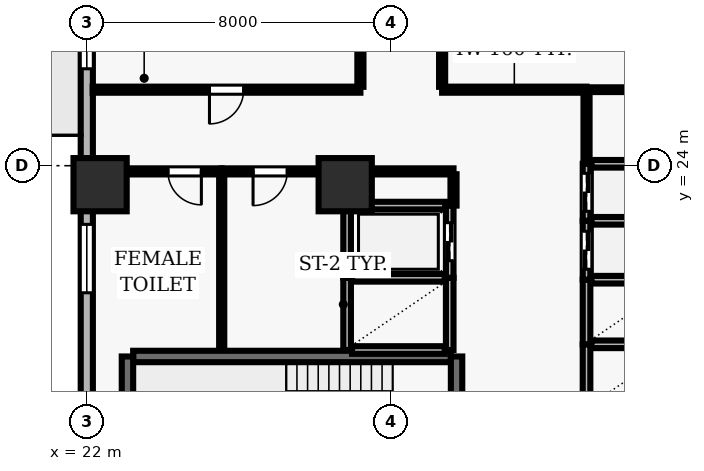
"""IFC4 building model, lengths in metres.
Left out: names, types, materials, properties, quantities, classifications, styles, units other than length and angle.
Written with IfcOpenShell. Run it as: python <this file> out.ifc"""

import sys

from ifc_helpers import new_model, si_unit, direction, frame, frame_2d, origin, origin_2d, place, context, subcontext, project, spatial, rectangle, extrude, element, fill, save


model = new_model("IFC4")
c1 = context("Model", 3, precision=1e-05, world=origin(), true_north=direction((0.0, 1.0)))
c2 = subcontext(c1, "Body", "Model", "MODEL_VIEW")
j1 = project(units=[si_unit("LENGTHUNIT", "METRE"), si_unit("PLANEANGLEUNIT", "RADIAN")], contexts=[c1])
p1 = place(None, origin())
s1 = spatial("IfcSite", under=j1, at=p1, CompositionType="ELEMENT")
p2 = place(p1, origin())
s2 = spatial("IfcBuilding", under=s1, at=p2, CompositionType="ELEMENT")
p3 = place(p2, frame((0.0, 0.0, 42.7)))
s3 = spatial("IfcBuildingStorey", under=s2, at=p3, CompositionType="ELEMENT", Elevation=42.7)
for number, where, z_axis, x_axis in (
    (1, (22.35, 23.5, 0.0), (0.0, 0.0, 1.0), (1.0, 0.0, 0.0)),
    (2, (28.8, 23.5, 0.0), (0.0, 0.0, 1.0), (1.0, 0.0, 0.0)),
):
    element("IfcColumn", number, at=place(p3, frame(where, z_axis=z_axis, x_axis=x_axis)), inside=s3, PredefinedType="COLUMN", context=c2, shape_type="SweptSolid", body=[
        extrude(rectangle(XDim=1.4, YDim=1.4, at=origin_2d()), origin(), (0.0, 0.0, 1.0), 3.9),
    ])
p4 = place(p3, frame((22.0, 51.5, 0.0), z_axis=(0.0, 0.0, 1.0), x_axis=(0.0, -1.0, 0.0)))
e3 = element("IfcWall", 3, at=p4, inside=s3, PredefinedType="SOLIDWALL", context=c2, shape_type="SweptSolid", body=[
    extrude(rectangle(XDim=49.0, YDim=0.32, at=frame_2d((24.5, 0.0))), origin(), (0.0, 0.0, 1.0), 3.69),
])
p5 = place(p4, frame((12.1, 0.0, 0.0)))
e4 = element("IfcOpeningElement", 4, at=p5, cuts=e3, PredefinedType="OPENING", context=c2, shape_type="SweptSolid", body=[
    extrude(rectangle(XDim=1.0, YDim=2.2, at=frame_2d((0.5, 1.1))), frame((0.0, 0.17, 0.0), z_axis=(0.0, -1.0, 0.0), x_axis=(1.0, 0.0, 0.0)), (0.0, 0.0, 1.0), 0.34),
])
p6 = place(p4, frame((1.822, 0.0, 0.9)))
e5 = element("IfcOpeningElement", 5, at=p6, cuts=e3, PredefinedType="OPENING", context=c2, shape_type="SweptSolid", body=[
    extrude(rectangle(XDim=1.8, YDim=2.2, at=frame_2d((0.9, 1.1))), frame((0.0, 0.17, 0.0), z_axis=(0.0, -1.0, 0.0), x_axis=(1.0, 0.0, 0.0)), (0.0, 0.0, 1.0), 0.34),
])
p7 = place(p4, frame((7.267, 0.0, 0.9)))
e6 = element("IfcOpeningElement", 6, at=p7, cuts=e3, PredefinedType="OPENING", context=c2, shape_type="SweptSolid", body=[
    extrude(rectangle(XDim=1.8, YDim=2.2, at=frame_2d((0.9, 1.1))), frame((0.0, 0.17, 0.0), z_axis=(0.0, -1.0, 0.0), x_axis=(1.0, 0.0, 0.0)), (0.0, 0.0, 1.0), 0.34),
])
p8 = place(p4, frame((19.056, 0.0, 0.9)))
e7 = element("IfcOpeningElement", 7, at=p8, cuts=e3, PredefinedType="OPENING", context=c2, shape_type="SweptSolid", body=[
    extrude(rectangle(XDim=1.8, YDim=2.2, at=frame_2d((0.9, 1.1))), frame((0.0, 0.17, 0.0), z_axis=(0.0, -1.0, 0.0), x_axis=(1.0, 0.0, 0.0)), (0.0, 0.0, 1.0), 0.34),
])
p9 = place(p4, frame((23.15, 0.0, 0.9)))
e8 = element("IfcOpeningElement", 8, at=p9, cuts=e3, PredefinedType="OPENING", context=c2, shape_type="SweptSolid", body=[
    extrude(rectangle(XDim=1.8, YDim=2.2, at=frame_2d((0.9, 1.1))), frame((0.0, 0.17, 0.0), z_axis=(0.0, -1.0, 0.0), x_axis=(1.0, 0.0, 0.0)), (0.0, 0.0, 1.0), 0.34),
])
p10 = place(p4, frame((29.044, 0.0, 0.9)))
e9 = element("IfcOpeningElement", 9, at=p10, cuts=e3, PredefinedType="OPENING", context=c2, shape_type="SweptSolid", body=[
    extrude(rectangle(XDim=1.8, YDim=2.2, at=frame_2d((0.9, 1.1))), frame((0.0, 0.17, 0.0), z_axis=(0.0, -1.0, 0.0), x_axis=(1.0, 0.0, 0.0)), (0.0, 0.0, 1.0), 0.34),
])
p11 = place(p4, frame((34.039, 0.0, 0.9)))
e10 = element("IfcOpeningElement", 10, at=p11, cuts=e3, PredefinedType="OPENING", context=c2, shape_type="SweptSolid", body=[
    extrude(rectangle(XDim=1.8, YDim=2.2, at=frame_2d((0.9, 1.1))), frame((0.0, 0.17, 0.0), z_axis=(0.0, -1.0, 0.0), x_axis=(1.0, 0.0, 0.0)), (0.0, 0.0, 1.0), 0.34),
])
p12 = place(p4, frame((39.933, 0.0, 0.9)))
e11 = element("IfcOpeningElement", 11, at=p12, cuts=e3, PredefinedType="OPENING", context=c2, shape_type="SweptSolid", body=[
    extrude(rectangle(XDim=1.8, YDim=2.2, at=frame_2d((0.9, 1.1))), frame((0.0, 0.17, 0.0), z_axis=(0.0, -1.0, 0.0), x_axis=(1.0, 0.0, 0.0)), (0.0, 0.0, 1.0), 0.34),
])
p13 = place(p3, frame((31.58, 18.98, 0.0), z_axis=(0.0, 0.0, 1.0), x_axis=(-1.0, 0.0, 0.0)))
e12 = element("IfcWall", 12, at=p13, inside=s3, PredefinedType="SHEAR", context=c2, shape_type="SweptSolid", body=[
    extrude(rectangle(XDim=8.36, YDim=0.3, at=frame_2d((4.18, 0.0))), origin(), (0.0, 0.0, 1.0), 3.69),
])
p14 = place(p3, frame((23.07, 18.98, 0.0), z_axis=(0.0, 0.0, 1.0), x_axis=(0.0, -1.0, 0.0)))
e13 = element("IfcWall", 13, at=p14, inside=s3, PredefinedType="SHEAR", context=c2, shape_type="SweptSolid", body=[
    extrude(rectangle(XDim=3.51, YDim=0.3, at=frame_2d((1.755, 0.0))), origin(), (0.0, 0.0, 1.0), 3.69),
])
p15 = place(p3, frame((31.73, 15.47, 0.0), z_axis=(0.0, 0.0, 1.0), x_axis=(0.0, 1.0, 0.0)))
e14 = element("IfcWall", 14, at=p15, inside=s3, PredefinedType="SHEAR", context=c2, shape_type="SweptSolid", body=[
    extrude(rectangle(XDim=3.51, YDim=0.3, at=frame_2d((1.755, 0.0))), origin(), (0.0, 0.0, 1.0), 3.69),
])
p16 = place(p15, frame((1.18, 0.0, 0.0)))
e15 = element("IfcOpeningElement", 15, at=p16, cuts=e14, PredefinedType="OPENING", context=c2, shape_type="SweptSolid", body=[
    extrude(rectangle(XDim=1.15, YDim=2.15, at=frame_2d((0.575, 1.075))), frame((0.0, 0.16, 0.0), z_axis=(0.0, -1.0, 0.0), x_axis=(1.0, 0.0, 0.0)), (0.0, 0.0, 1.0), 0.32),
])
p17 = place(p3, frame((35.15, 19.3, 0.0), z_axis=(0.0, 0.0, 1.0), x_axis=(0.0, -1.0, 0.0)))
e16 = element("IfcWall", 16, at=p17, inside=s3, PredefinedType="SOLIDWALL", context=c2, shape_type="SweptSolid", body=[
    extrude(rectangle(XDim=1.7, YDim=0.2, at=frame_2d((0.85, 0.0))), origin(), (0.0, 0.0, 1.0), 3.69),
])
p18 = place(p3, frame((37.42, 19.3, 0.0), z_axis=(0.0, 0.0, 1.0), x_axis=(-1.0, 0.0, 0.0)))
e17 = element("IfcWall", 17, at=p18, inside=s3, PredefinedType="SOLIDWALL", context=c2, shape_type="SweptSolid", body=[
    extrude(rectangle(XDim=2.14, YDim=0.2, at=frame_2d((1.07, 0.0))), origin(), (0.0, 0.0, 1.0), 3.69),
])
p19 = place(p3, frame((35.15, 21.0, 0.0), z_axis=(0.0, 0.0, 1.0), x_axis=(0.0, -1.0, 0.0)))
e18 = element("IfcWall", 18, at=p19, inside=s3, PredefinedType="SOLIDWALL", context=c2, shape_type="SweptSolid", body=[
    extrude(rectangle(XDim=1.7, YDim=0.2, at=frame_2d((0.85, 0.0))), origin(), (0.0, 0.0, 1.0), 3.69),
])
p20 = place(p3, frame((37.42, 21.0, 0.0), z_axis=(0.0, 0.0, 1.0), x_axis=(-1.0, 0.0, 0.0)))
e19 = element("IfcWall", 19, at=p20, inside=s3, PredefinedType="SOLIDWALL", context=c2, shape_type="SweptSolid", body=[
    extrude(rectangle(XDim=2.14, YDim=0.2, at=frame_2d((1.07, 0.0))), origin(), (0.0, 0.0, 1.0), 3.69),
])
for number, where, z_axis, x_axis in (
    (20, (28.85, 21.05, 0.0), (0.0, 0.0, 1.0), (0.0, -1.0, 0.0)),
    (21, (31.55, 19.15, 0.0), (0.0, 0.0, 1.0), (0.0, 1.0, 0.0)),
):
    element("IfcWall", number, at=place(p3, frame(where, z_axis=z_axis, x_axis=x_axis)), inside=s3, PredefinedType="SOLIDWALL", context=c2, shape_type="SweptSolid", body=[
        extrude(rectangle(XDim=1.9, YDim=0.2, at=frame_2d((0.95, 0.0))), origin(), (0.0, 0.0, 1.0), 3.69),
    ])
for number, where, z_axis, x_axis in (
    (22, (28.98, 19.15, 0.0), (0.0, 0.0, 1.0), (1.0, 0.0, 0.0)),
    (23, (31.42, 21.05, 0.0), (0.0, 0.0, 1.0), (-1.0, 0.0, 0.0)),
):
    element("IfcWall", number, at=place(p3, frame(where, z_axis=z_axis, x_axis=x_axis)), inside=s3, PredefinedType="SOLIDWALL", context=c2, shape_type="SweptSolid", body=[
        extrude(rectangle(XDim=2.44, YDim=0.2, at=frame_2d((1.22, 0.0))), origin(), (0.0, 0.0, 1.0), 3.69),
    ])
p21 = place(p3, frame((35.15, 22.55, 0.0), z_axis=(0.0, 0.0, 1.0), x_axis=(0.0, -1.0, 0.0)))
e24 = element("IfcWall", 24, at=p21, inside=s3, PredefinedType="SOLIDWALL", context=c2, shape_type="SweptSolid", body=[
    extrude(rectangle(XDim=1.55, YDim=0.2, at=frame_2d((0.775, 0.0))), origin(), (0.0, 0.0, 1.0), 3.69),
])
p22 = place(p21, frame((0.275, 0.0, 0.0)))
e25 = element("IfcOpeningElement", 25, at=p22, cuts=e24, PredefinedType="OPENING", context=c2, shape_type="SweptSolid", body=[
    extrude(rectangle(XDim=1.0, YDim=2.1, at=frame_2d((0.5, 1.05))), frame((0.0, 0.11, 0.0), z_axis=(0.0, -1.0, 0.0), x_axis=(1.0, 0.0, 0.0)), (0.0, 0.0, 1.0), 0.22),
])
p23 = place(p3, frame((37.42, 22.55, 0.0), z_axis=(0.0, 0.0, 1.0), x_axis=(-1.0, 0.0, 0.0)))
e26 = element("IfcWall", 26, at=p23, inside=s3, PredefinedType="SOLIDWALL", context=c2, shape_type="SweptSolid", body=[
    extrude(rectangle(XDim=2.14, YDim=0.2, at=frame_2d((1.07, 0.0))), origin(), (0.0, 0.0, 1.0), 3.69),
])
p24 = place(p3, frame((35.15, 24.05, 0.0), z_axis=(0.0, 0.0, 1.0), x_axis=(0.0, -1.0, 0.0)))
e27 = element("IfcWall", 27, at=p24, inside=s3, PredefinedType="SOLIDWALL", context=c2, shape_type="SweptSolid", body=[
    extrude(rectangle(XDim=1.5, YDim=0.2, at=frame_2d((0.75, 0.0))), origin(), (0.0, 0.0, 1.0), 3.69),
])
p25 = place(p24, frame((0.25, 0.0, 0.0)))
e28 = element("IfcOpeningElement", 28, at=p25, cuts=e27, PredefinedType="OPENING", context=c2, shape_type="SweptSolid", body=[
    extrude(rectangle(XDim=1.0, YDim=2.1, at=frame_2d((0.5, 1.05))), frame((0.0, 0.11, 0.0), z_axis=(0.0, -1.0, 0.0), x_axis=(1.0, 0.0, 0.0)), (0.0, 0.0, 1.0), 0.22),
])
p26 = place(p3, frame((37.42, 24.05, 0.0), z_axis=(0.0, 0.0, 1.0), x_axis=(-1.0, 0.0, 0.0)))
e29 = element("IfcWall", 29, at=p26, inside=s3, PredefinedType="SOLIDWALL", context=c2, shape_type="SweptSolid", body=[
    extrude(rectangle(XDim=2.14, YDim=0.2, at=frame_2d((1.07, 0.0))), origin(), (0.0, 0.0, 1.0), 3.69),
])
p27 = place(p3, frame((28.85, 22.95, 0.0), z_axis=(0.0, 0.0, 1.0), x_axis=(0.0, -1.0, 0.0)))
e30 = element("IfcWall", 30, at=p27, inside=s3, PredefinedType="SOLIDWALL", context=c2, shape_type="SweptSolid", body=[
    extrude(rectangle(XDim=1.9, YDim=0.2, at=frame_2d((0.95, 0.0))), origin(), (0.0, 0.0, 1.0), 3.69),
])
p28 = place(p3, frame((31.55, 21.05, 0.0), z_axis=(0.0, 0.0, 1.0), x_axis=(0.0, 1.0, 0.0)))
e31 = element("IfcWall", 31, at=p28, inside=s3, PredefinedType="SOLIDWALL", context=c2, shape_type="SweptSolid", body=[
    extrude(rectangle(XDim=1.9, YDim=0.2, at=frame_2d((0.95, 0.0))), origin(), (0.0, 0.0, 1.0), 3.69),
])
p29 = place(p28, frame((0.45, 0.0, 0.0)))
e32 = element("IfcOpeningElement", 32, at=p29, cuts=e31, PredefinedType="OPENING", context=c2, shape_type="SweptSolid", body=[
    extrude(rectangle(XDim=1.0, YDim=2.1, at=frame_2d((0.5, 1.05))), frame((0.0, 0.11, 0.0), z_axis=(0.0, -1.0, 0.0), x_axis=(1.0, 0.0, 0.0)), (0.0, 0.0, 1.0), 0.22),
])
p30 = place(p3, frame((31.43, 22.95, 0.0), z_axis=(0.0, 0.0, 1.0), x_axis=(-1.0, 0.0, 0.0)))
e33 = element("IfcWall", 33, at=p30, inside=s3, PredefinedType="SOLIDWALL", context=c2, shape_type="SweptSolid", body=[
    extrude(rectangle(XDim=2.46, YDim=0.2, at=frame_2d((1.23, 0.0))), origin(), (0.0, 0.0, 1.0), 3.69),
])
p31 = place(p3, frame((25.55, 23.85, 0.0), z_axis=(0.0, 0.0, 1.0), x_axis=(-1.0, 0.0, 0.0)))
e34 = element("IfcWall", 34, at=p31, inside=s3, PredefinedType="PARTITIONING", context=c2, shape_type="SweptSolid", body=[
    extrude(rectangle(XDim=3.35, YDim=0.16, at=frame_2d((1.675, 0.0))), origin(), (0.0, 0.0, 1.0), 3.055),
])
p32 = place(p31, frame((0.535, 0.0, 0.0)))
e35 = element("IfcOpeningElement", 35, at=p32, cuts=e34, PredefinedType="OPENING", context=c2, shape_type="SweptSolid", body=[
    extrude(rectangle(XDim=0.88, YDim=2.1, at=frame_2d((0.44, 1.05))), frame((0.0, 0.09, 0.0), z_axis=(0.0, -1.0, 0.0), x_axis=(1.0, 0.0, 0.0)), (0.0, 0.0, 1.0), 0.18),
])
p33 = place(p3, frame((28.8, 23.85, 0.0), z_axis=(0.0, 0.0, 1.0), x_axis=(-1.0, 0.0, 0.0)))
e36 = element("IfcWall", 36, at=p33, inside=s3, PredefinedType="PARTITIONING", context=c2, shape_type="SweptSolid", body=[
    extrude(rectangle(XDim=3.25, YDim=0.16, at=frame_2d((1.625, 0.0))), origin(), (0.0, 0.0, 1.0), 3.055),
])
p34 = place(p33, frame((1.525, 0.0, 0.0)))
e37 = element("IfcOpeningElement", 37, at=p34, cuts=e36, PredefinedType="OPENING", context=c2, shape_type="SweptSolid", body=[
    extrude(rectangle(XDim=0.9, YDim=2.1, at=frame_2d((0.45, 1.05))), frame((0.0, 0.09, 0.0), z_axis=(0.0, -1.0, 0.0), x_axis=(1.0, 0.0, 0.0)), (0.0, 0.0, 1.0), 0.18),
])
p35 = place(p3, frame((28.8, 23.85, 0.0), z_axis=(0.0, 0.0, 1.0), x_axis=(1.0, 0.0, 0.0)))
e38 = element("IfcWall", 38, at=p35, inside=s3, PredefinedType="PARTITIONING", context=c2, shape_type="SweptSolid", body=[
    extrude(rectangle(XDim=2.85, YDim=0.16, at=frame_2d((1.425, 0.0))), origin(), (0.0, 0.0, 1.0), 3.69),
])
p36 = place(p3, frame((29.2, 26.0, 0.0), z_axis=(0.0, 0.0, 1.0), x_axis=(-1.0, 0.0, 0.0)))
e39 = element("IfcWall", 39, at=p36, inside=s3, PredefinedType="PARTITIONING", context=c2, shape_type="SweptSolid", body=[
    extrude(rectangle(XDim=7.045, YDim=0.16, at=frame_2d((3.522, 0.0))), origin(), (0.0, 0.0, 1.0), 3.69),
])
p37 = place(p36, frame((3.072, 0.0, 0.0)))
e40 = element("IfcOpeningElement", 40, at=p37, cuts=e39, PredefinedType="OPENING", context=c2, shape_type="SweptSolid", body=[
    extrude(rectangle(XDim=0.9, YDim=2.1, at=frame_2d((0.45, 1.05))), frame((0.0, 0.09, 0.0), z_axis=(0.0, -1.0, 0.0), x_axis=(1.0, 0.0, 0.0)), (0.0, 0.0, 1.0), 0.18),
])
p38 = place(p3, frame((35.15, 26.0, 0.0), z_axis=(0.0, 0.0, 1.0), x_axis=(-1.0, 0.0, 0.0)))
e41 = element("IfcWall", 41, at=p38, inside=s3, PredefinedType="PARTITIONING", context=c2, shape_type="SweptSolid", body=[
    extrude(rectangle(XDim=3.8, YDim=0.16, at=frame_2d((1.9, 0.0))), origin(), (0.0, 0.0, 1.0), 3.69),
])
p39 = place(p3, frame((35.15, 26.0, 0.0), z_axis=(0.0, 0.0, 1.0), x_axis=(1.0, 0.0, 0.0)))
e42 = element("IfcWall", 42, at=p39, inside=s3, PredefinedType="PARTITIONING", context=c2, shape_type="SweptSolid", body=[
    extrude(rectangle(XDim=2.7, YDim=0.125, at=frame_2d((1.35, 0.0))), origin(), (0.0, 0.0, 1.0), 3.69),
])
p40 = place(p3, frame((25.55, 19.16, 0.0), z_axis=(0.0, 0.0, 1.0), x_axis=(0.0, 1.0, 0.0)))
e43 = element("IfcWall", 43, at=p40, inside=s3, PredefinedType="PARTITIONING", context=c2, shape_type="SweptSolid", body=[
    extrude(rectangle(XDim=4.615, YDim=0.135, at=frame_2d((2.308, 0.0))), origin(), (0.0, 0.0, 1.0), 3.69),
])
p41 = place(p3, frame((28.8, 22.95, 0.0), z_axis=(0.0, 0.0, 1.0), x_axis=(0.0, 1.0, 0.0)))
e44 = element("IfcWall", 44, at=p41, inside=s3, PredefinedType="PARTITIONING", context=c2, shape_type="SweptSolid", body=[
    extrude(rectangle(XDim=0.825, YDim=0.125, at=frame_2d((0.413, 0.0))), origin(), (0.0, 0.0, 1.0), 3.69),
])
p42 = place(p3, frame((29.2, 32.943, 0.0), z_axis=(0.0, 0.0, 1.0), x_axis=(0.0, -1.0, 0.0)))
e45 = element("IfcWall", 45, at=p42, inside=s3, PredefinedType="PARTITIONING", context=c2, shape_type="SweptSolid", body=[
    extrude(rectangle(XDim=6.868, YDim=0.16, at=frame_2d((3.434, 0.0))), origin(), (0.0, 0.0, 1.0), 3.69),
])
p43 = place(p3, frame((31.35, 26.075, 0.0), z_axis=(0.0, 0.0, 1.0), x_axis=(0.0, 1.0, 0.0)))
e46 = element("IfcWall", 46, at=p43, inside=s3, PredefinedType="PARTITIONING", context=c2, shape_type="SweptSolid", body=[
    extrude(rectangle(XDim=6.868, YDim=0.16, at=frame_2d((3.434, 0.0))), origin(), (0.0, 0.0, 1.0), 3.69),
])
p44 = place(p43, frame((2.984, 0.0, 0.0)))
e47 = element("IfcOpeningElement", 47, at=p44, cuts=e46, PredefinedType="OPENING", context=c2, shape_type="SweptSolid", body=[
    extrude(rectangle(XDim=0.9, YDim=2.1, at=frame_2d((0.45, 1.05))), frame((0.0, 0.09, 0.0), z_axis=(0.0, -1.0, 0.0), x_axis=(1.0, 0.0, 0.0)), (0.0, 0.0, 1.0), 0.18),
])
p45 = place(p3, frame((31.65, 23.775, 0.0), z_axis=(0.0, 0.0, 1.0), x_axis=(0.0, -1.0, 0.0)))
e48 = element("IfcWall", 48, at=p45, inside=s3, PredefinedType="PARTITIONING", context=c2, shape_type="SweptSolid", body=[
    extrude(rectangle(XDim=0.825, YDim=0.16, at=frame_2d((0.413, 0.0))), origin(), (0.0, 0.0, 1.0), 3.69),
])
p46 = place(p3, frame((35.15, 24.07, 0.0), z_axis=(0.0, 0.0, 1.0), x_axis=(0.0, 1.0, 0.0)))
e49 = element("IfcWall", 49, at=p46, inside=s3, PredefinedType="PARTITIONING", context=c2, shape_type="SweptSolid", body=[
    extrude(rectangle(XDim=1.855, YDim=0.16, at=frame_2d((0.927, 0.0))), origin(), (0.0, 0.0, 1.0), 3.69),
])
p47 = place(p9, origin())
e50 = element("IfcWindow", 50, at=p47, inside=s3, PartitioningType="SINGLE_PANEL", PredefinedType="WINDOW", context=c2, shape_type="SweptSolid", body=[
    extrude(rectangle(XDim=1.8, YDim=2.2, at=frame_2d((0.9, 1.1))), frame((0.0, 0.03, 0.0), z_axis=(0.0, -1.0, 0.0), x_axis=(1.0, 0.0, 0.0)), (0.0, 0.0, 1.0), 0.06),
])
fill(e8, e50)
p48 = place(p10, origin())
e51 = element("IfcWindow", 51, at=p48, inside=s3, PartitioningType="SINGLE_PANEL", PredefinedType="WINDOW", context=c2, shape_type="SweptSolid", body=[
    extrude(rectangle(XDim=1.8, YDim=2.2, at=frame_2d((0.9, 1.1))), frame((0.0, 0.03, 0.0), z_axis=(0.0, -1.0, 0.0), x_axis=(1.0, 0.0, 0.0)), (0.0, 0.0, 1.0), 0.06),
])
fill(e9, e51)
p49 = place(p22, origin())
e52 = element("IfcDoor", 52, at=p49, inside=s3, OperationType="DOUBLE_DOOR_SLIDING", PredefinedType="DOOR", context=c2, shape_type="SweptSolid", body=[
    extrude(rectangle(XDim=1.0, YDim=2.1, at=frame_2d((0.5, 1.05))), frame((0.0, 0.025, 0.0), z_axis=(0.0, -1.0, 0.0), x_axis=(1.0, 0.0, 0.0)), (0.0, 0.0, 1.0), 0.05),
])
fill(e25, e52)
p50 = place(p25, origin())
e53 = element("IfcDoor", 53, at=p50, inside=s3, OperationType="DOUBLE_DOOR_SLIDING", PredefinedType="DOOR", context=c2, shape_type="SweptSolid", body=[
    extrude(rectangle(XDim=1.0, YDim=2.1, at=frame_2d((0.5, 1.05))), frame((0.0, 0.025, 0.0), z_axis=(0.0, -1.0, 0.0), x_axis=(1.0, 0.0, 0.0)), (0.0, 0.0, 1.0), 0.05),
])
fill(e28, e53)
p51 = place(p29, origin())
e54 = element("IfcDoor", 54, at=p51, inside=s3, OperationType="DOUBLE_DOOR_SLIDING", PredefinedType="DOOR", context=c2, shape_type="SweptSolid", body=[
    extrude(rectangle(XDim=1.0, YDim=2.1, at=frame_2d((0.5, 1.05))), frame((0.0, 0.025, 0.0), z_axis=(0.0, -1.0, 0.0), x_axis=(1.0, 0.0, 0.0)), (0.0, 0.0, 1.0), 0.05),
])
fill(e32, e54)
p52 = place(p32, origin())
e55 = element("IfcDoor", 55, at=p52, inside=s3, OperationType="SINGLE_SWING_LEFT", PredefinedType="DOOR", context=c2, shape_type="SweptSolid", body=[
    extrude(rectangle(XDim=0.88, YDim=2.1, at=frame_2d((0.44, 1.05))), frame((0.0, 0.025, 0.0), z_axis=(0.0, -1.0, 0.0), x_axis=(1.0, 0.0, 0.0)), (0.0, 0.0, 1.0), 0.05),
])
fill(e35, e55)
p53 = place(p34, origin())
e56 = element("IfcDoor", 56, at=p53, inside=s3, OperationType="SINGLE_SWING_RIGHT", PredefinedType="DOOR", context=c2, shape_type="SweptSolid", body=[
    extrude(rectangle(XDim=0.9, YDim=2.1, at=frame_2d((0.45, 1.05))), frame((0.0, 0.025, 0.0), z_axis=(0.0, -1.0, 0.0), x_axis=(1.0, 0.0, 0.0)), (0.0, 0.0, 1.0), 0.05),
])
fill(e37, e56)
p54 = place(p37, origin())
e57 = element("IfcDoor", 57, at=p54, inside=s3, OperationType="SINGLE_SWING_RIGHT", PredefinedType="DOOR", context=c2, shape_type="SweptSolid", body=[
    extrude(rectangle(XDim=0.9, YDim=2.1, at=frame_2d((0.45, 1.05))), frame((0.0, 0.025, 0.0), z_axis=(0.0, -1.0, 0.0), x_axis=(1.0, 0.0, 0.0)), (0.0, 0.0, 1.0), 0.05),
])
fill(e40, e57)
save(model, sys.argv[1])
